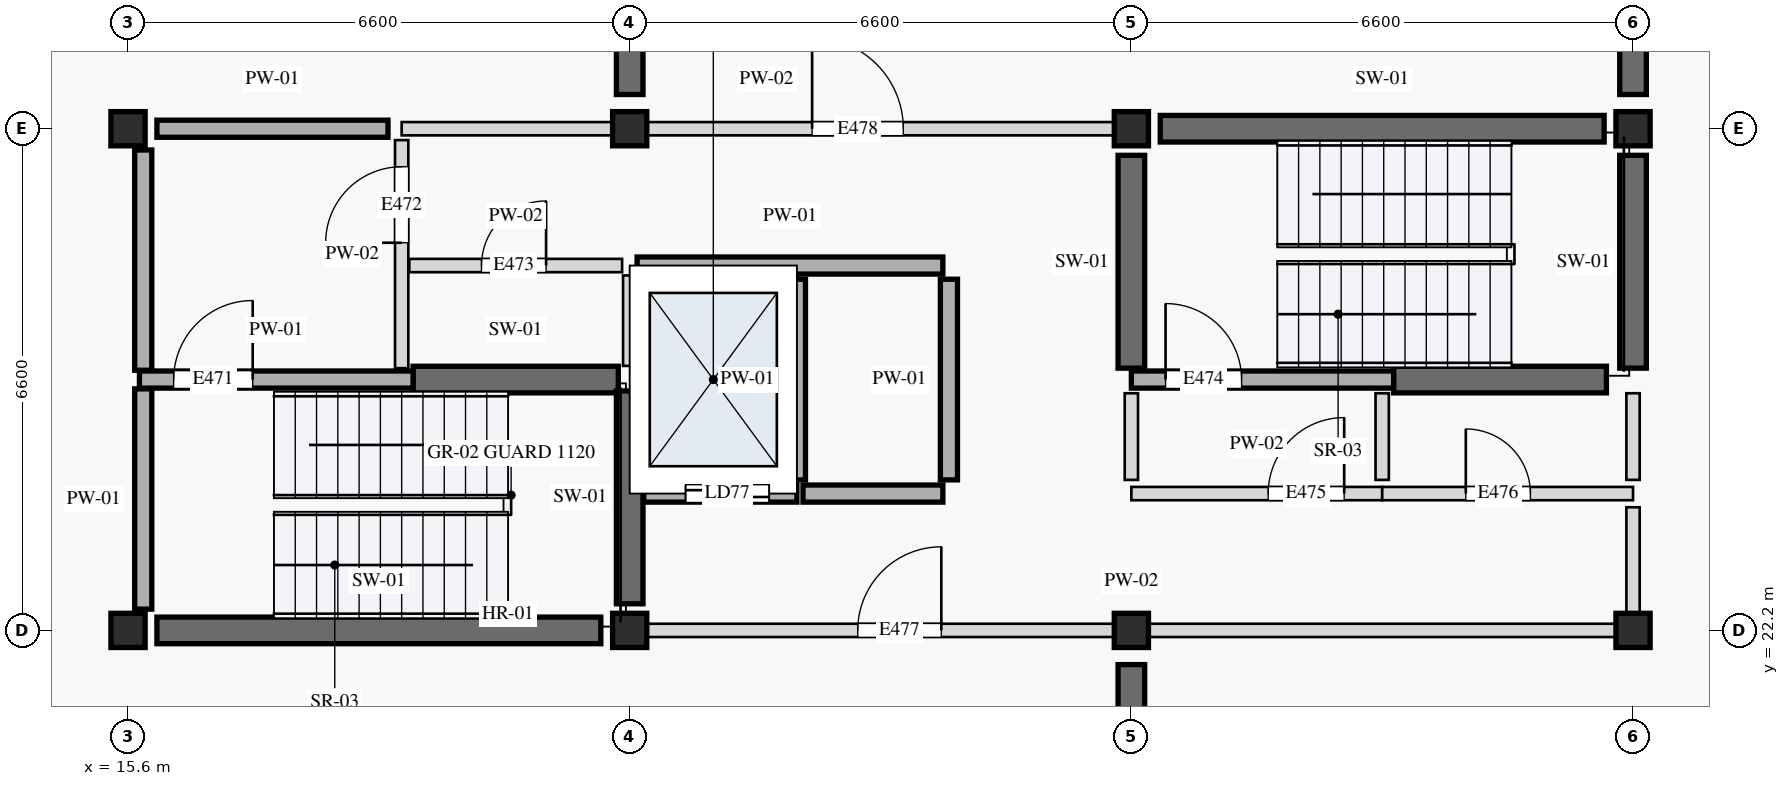
"""IFC4 building model, lengths in metres.
Left out: names, types, materials, properties, quantities, classifications, styles, units other than length and angle.
Written with IfcOpenShell. Run it as: python <this file> out.ifc"""

import sys

from ifc_helpers import new_model, si_unit, direction, frame, frame_2d, origin, origin_2d, place, context, subcontext, project, spatial, rectangle, extrude, element, fill, save


model = new_model("IFC4")
c1 = context("Model", 3, precision=1e-05, world=origin(), true_north=direction((0.0, 1.0)))
c2 = subcontext(c1, "Body", "Model", "MODEL_VIEW")
j1 = project(units=[si_unit("LENGTHUNIT", "METRE"), si_unit("PLANEANGLEUNIT", "RADIAN")], contexts=[c1])
p1 = place(None, origin())
s1 = spatial("IfcSite", under=j1, at=p1, CompositionType="ELEMENT")
p2 = place(p1, origin())
s2 = spatial("IfcBuilding", under=s1, at=p2, CompositionType="ELEMENT")
p3 = place(p2, frame((0.0, 0.0, -3.8)))
s3 = spatial("IfcBuildingStorey", under=s2, at=p3, CompositionType="ELEMENT", Elevation=-3.8)
for number, where, z_axis, x_axis in (
    (1, (15.6, 22.2, 0.0), (0.0, 0.0, 1.0), (1.0, 0.0, 0.0)),
    (2, (15.6, 28.8, 0.0), (0.0, 0.0, 1.0), (1.0, 0.0, 0.0)),
    (3, (22.2, 22.2, 0.0), (0.0, 0.0, 1.0), (1.0, 0.0, 0.0)),
    (4, (22.2, 28.8, 0.0), (0.0, 0.0, 1.0), (1.0, 0.0, 0.0)),
    (5, (28.8, 22.2, 0.0), (0.0, 0.0, 1.0), (1.0, 0.0, 0.0)),
    (6, (28.8, 28.8, 0.0), (0.0, 0.0, 1.0), (1.0, 0.0, 0.0)),
    (7, (35.4, 22.2, 0.0), (0.0, 0.0, 1.0), (1.0, 0.0, 0.0)),
    (8, (35.4, 28.8, 0.0), (0.0, 0.0, 1.0), (1.0, 0.0, 0.0)),
):
    element("IfcColumn", number, at=place(p3, frame(where, z_axis=z_axis, x_axis=x_axis)), inside=s3, PredefinedType="COLUMN", context=c2, shape_type="SweptSolid", body=[
        extrude(rectangle(XDim=0.45, YDim=0.45, at=origin_2d()), origin(), (0.0, 0.0, 1.0), 3.8),
    ])
p4 = place(p3, frame((15.98, 22.2, 0.0), z_axis=(0.0, 0.0, 1.0), x_axis=(1.0, 0.0, 0.0)))
e9 = element("IfcWall", 9, at=p4, inside=s3, PredefinedType="SHEAR", context=c2, shape_type="SweptSolid", body=[
    extrude(rectangle(XDim=5.84, YDim=0.35, at=frame_2d((2.92, 0.0))), origin(), (0.0, 0.0, 1.0), 3.52),
])
p5 = place(p3, frame((19.35, 25.5, 0.0), z_axis=(0.0, 0.0, 1.0), x_axis=(1.0, 0.0, 0.0)))
e10 = element("IfcWall", 10, at=p5, inside=s3, PredefinedType="SHEAR", context=c2, shape_type="SweptSolid", body=[
    extrude(rectangle(XDim=2.7, YDim=0.35, at=frame_2d((1.35, 0.0))), origin(), (0.0, 0.0, 1.0), 3.52),
])
p6 = place(p3, frame((22.2, 22.55, 0.0), z_axis=(0.0, 0.0, 1.0), x_axis=(0.0, 1.0, 0.0)))
e11 = element("IfcWall", 11, at=p6, inside=s3, PredefinedType="SHEAR", context=c2, shape_type="SweptSolid", body=[
    extrude(rectangle(XDim=2.8, YDim=0.35, at=frame_2d((1.4, 0.0))), origin(), (0.0, 0.0, 1.0), 3.52),
])
p7 = place(p3, frame((29.18, 28.8, 0.0), z_axis=(0.0, 0.0, 1.0), x_axis=(1.0, 0.0, 0.0)))
e12 = element("IfcWall", 12, at=p7, inside=s3, PredefinedType="SHEAR", context=c2, shape_type="SweptSolid", body=[
    extrude(rectangle(XDim=5.84, YDim=0.35, at=frame_2d((2.92, 0.0))), origin(), (0.0, 0.0, 1.0), 3.52),
])
for number, where, z_axis, x_axis in (
    (13, (32.25, 25.5, 0.0), (0.0, 0.0, 1.0), (1.0, 0.0, 0.0)),
    (14, (28.8, 25.65, 0.0), (0.0, 0.0, 1.0), (0.0, 1.0, 0.0)),
    (15, (35.4, 25.65, 0.0), (0.0, 0.0, 1.0), (0.0, 1.0, 0.0)),
):
    element("IfcWall", number, at=place(p3, frame(where, z_axis=z_axis, x_axis=x_axis)), inside=s3, PredefinedType="SHEAR", context=c2, shape_type="SweptSolid", body=[
        extrude(rectangle(XDim=2.8, YDim=0.35, at=frame_2d((1.4, 0.0))), origin(), (0.0, 0.0, 1.0), 3.52),
    ])
for number, where, z_axis, x_axis in (
    (16, (28.8, 16.05, 0.0), (0.0, 0.0, 1.0), (0.0, 1.0, 0.0)),
    (17, (22.2, 29.25, 0.0), (0.0, 0.0, 1.0), (0.0, 1.0, 0.0)),
    (18, (35.4, 29.25, 0.0), (0.0, 0.0, 1.0), (0.0, 1.0, 0.0)),
):
    element("IfcWall", number, at=place(p3, frame(where, z_axis=z_axis, x_axis=x_axis)), inside=s3, PredefinedType="SHEAR", context=c2, shape_type="SweptSolid", body=[
        extrude(rectangle(XDim=5.7, YDim=0.35, at=frame_2d((2.85, 0.0))), origin(), (0.0, 0.0, 1.0), 3.52),
    ])
p8 = place(p3, frame((15.75, 25.5, 0.0), z_axis=(0.0, 0.0, 1.0), x_axis=(1.0, 0.0, 0.0)))
e19 = element("IfcWall", 19, at=p8, inside=s3, PredefinedType="STANDARD", context=c2, shape_type="SweptSolid", body=[
    extrude(rectangle(XDim=3.6, YDim=0.225, at=frame_2d((1.8, 0.0))), origin(), (0.0, 0.0, 1.0), 3.52),
])
p9 = place(p8, frame((0.45, 0.0, 0.0)))
e20 = element("IfcOpeningElement", 20, at=p9, cuts=e19, PredefinedType="OPENING", context=c2, shape_type="SweptSolid", body=[
    extrude(rectangle(XDim=1.04, YDim=2.12, at=frame_2d((0.52, 1.06))), frame((0.0, 0.123, 0.0), z_axis=(0.0, -1.0, 0.0), x_axis=(1.0, 0.0, 0.0)), (0.0, 0.0, 1.0), 0.245),
])
p10 = place(p3, frame((19.2, 25.65, 0.0), z_axis=(0.0, 0.0, 1.0), x_axis=(0.0, 1.0, 0.0)))
e21 = element("IfcWall", 21, at=p10, inside=s3, PredefinedType="PARTITIONING", context=c2, shape_type="SweptSolid", body=[
    extrude(rectangle(XDim=3.0, YDim=0.175, at=frame_2d((1.5, 0.0))), origin(), (0.0, 0.0, 1.0), 3.52),
])
p11 = place(p10, frame((1.65, 0.0, 0.0)))
e22 = element("IfcOpeningElement", 22, at=p11, cuts=e21, PredefinedType="OPENING", context=c2, shape_type="SweptSolid", body=[
    extrude(rectangle(XDim=1.0, YDim=2.1, at=frame_2d((0.5, 1.05))), frame((0.0, 0.097, 0.0), z_axis=(0.0, -1.0, 0.0), x_axis=(1.0, 0.0, 0.0)), (0.0, 0.0, 1.0), 0.195),
])
p12 = place(p3, frame((19.3, 27.0, 0.0), z_axis=(0.0, 0.0, 1.0), x_axis=(1.0, 0.0, 0.0)))
e23 = element("IfcWall", 23, at=p12, inside=s3, PredefinedType="PARTITIONING", context=c2, shape_type="SweptSolid", body=[
    extrude(rectangle(XDim=2.8, YDim=0.175, at=frame_2d((1.4, 0.0))), origin(), (0.0, 0.0, 1.0), 3.52),
])
p13 = place(p12, frame((0.95, 0.0, 0.0)))
e24 = element("IfcOpeningElement", 24, at=p13, cuts=e23, PredefinedType="OPENING", context=c2, shape_type="SweptSolid", body=[
    extrude(rectangle(XDim=0.85, YDim=2.0, at=frame_2d((0.425, 1.0))), frame((0.0, 0.097, 0.0), z_axis=(0.0, -1.0, 0.0), x_axis=(1.0, 0.0, 0.0)), (0.0, 0.0, 1.0), 0.195),
])
p14 = place(p3, frame((22.2, 25.68, 0.0), z_axis=(0.0, 0.0, 1.0), x_axis=(0.0, 1.0, 0.0)))
e25 = element("IfcWall", 25, at=p14, inside=s3, PredefinedType="PARTITIONING", context=c2, shape_type="SweptSolid", body=[
    extrude(rectangle(XDim=1.19, YDim=0.175, at=frame_2d((0.595, 0.0))), origin(), (0.0, 0.0, 1.0), 3.52),
])
p15 = place(p3, frame((22.385, 24.0, 0.0), z_axis=(0.0, 0.0, 1.0), x_axis=(1.0, 0.0, 0.0)))
e26 = element("IfcWall", 26, at=p15, inside=s3, PredefinedType="STANDARD", context=c2, shape_type="SweptSolid", body=[
    extrude(rectangle(XDim=2.015, YDim=0.225, at=frame_2d((1.007, 0.0))), origin(), (0.0, 0.0, 1.0), 3.52),
])
p16 = place(p15, frame((0.55, 0.0, 0.0)))
e27 = element("IfcOpeningElement", 27, at=p16, cuts=e26, PredefinedType="OPENING", context=c2, shape_type="SweptSolid", body=[
    extrude(rectangle(XDim=1.1, YDim=2.1, at=frame_2d((0.55, 1.05))), frame((0.0, 0.123, 0.0), z_axis=(0.0, -1.0, 0.0), x_axis=(1.0, 0.0, 0.0)), (0.0, 0.0, 1.0), 0.245),
])
p17 = place(p3, frame((24.48, 24.0, 0.0), z_axis=(0.0, 0.0, 1.0), x_axis=(1.0, 0.0, 0.0)))
e28 = element("IfcWall", 28, at=p17, inside=s3, PredefinedType="STANDARD", context=c2, shape_type="SweptSolid", body=[
    extrude(rectangle(XDim=1.84, YDim=0.225, at=frame_2d((0.92, 0.0))), origin(), (0.0, 0.0, 1.0), 3.52),
])
p18 = place(p3, frame((22.298, 27.0, 0.0), z_axis=(0.0, 0.0, 1.0), x_axis=(1.0, 0.0, 0.0)))
e29 = element("IfcWall", 29, at=p18, inside=s3, PredefinedType="STANDARD", context=c2, shape_type="SweptSolid", body=[
    extrude(rectangle(XDim=4.022, YDim=0.225, at=frame_2d((2.011, 0.0))), origin(), (0.0, 0.0, 1.0), 3.52),
])
for number, where, z_axis, x_axis in (
    (30, (24.4, 24.18, 0.0), (0.0, 0.0, 1.0), (0.0, 1.0, 0.0)),
    (31, (26.4, 24.18, 0.0), (0.0, 0.0, 1.0), (0.0, 1.0, 0.0)),
):
    element("IfcWall", number, at=place(p3, frame(where, z_axis=z_axis, x_axis=x_axis)), inside=s3, PredefinedType="STANDARD", context=c2, shape_type="SweptSolid", body=[
        extrude(rectangle(XDim=2.64, YDim=0.225, at=frame_2d((1.32, 0.0))), origin(), (0.0, 0.0, 1.0), 3.52),
    ])
p19 = place(p3, frame((28.8, 25.5, 0.0), z_axis=(0.0, 0.0, 1.0), x_axis=(1.0, 0.0, 0.0)))
e32 = element("IfcWall", 32, at=p19, inside=s3, PredefinedType="STANDARD", context=c2, shape_type="SweptSolid", body=[
    extrude(rectangle(XDim=3.45, YDim=0.225, at=frame_2d((1.725, 0.0))), origin(), (0.0, 0.0, 1.0), 3.52),
])
p20 = place(p19, frame((0.45, 0.0, 0.0)))
e33 = element("IfcOpeningElement", 33, at=p20, cuts=e32, PredefinedType="OPENING", context=c2, shape_type="SweptSolid", body=[
    extrude(rectangle(XDim=1.0, YDim=2.1, at=frame_2d((0.5, 1.05))), frame((0.0, 0.123, 0.0), z_axis=(0.0, -1.0, 0.0), x_axis=(1.0, 0.0, 0.0)), (0.0, 0.0, 1.0), 0.245),
])
p21 = place(p3, frame((28.8, 24.0, 0.0), z_axis=(0.0, 0.0, 1.0), x_axis=(1.0, 0.0, 0.0)))
e34 = element("IfcWall", 34, at=p21, inside=s3, PredefinedType="PARTITIONING", context=c2, shape_type="SweptSolid", body=[
    extrude(rectangle(XDim=3.3, YDim=0.175, at=frame_2d((1.65, 0.0))), origin(), (0.0, 0.0, 1.0), 3.52),
])
p22 = place(p21, frame((1.8, 0.0, 0.0)))
e35 = element("IfcOpeningElement", 35, at=p22, cuts=e34, PredefinedType="OPENING", context=c2, shape_type="SweptSolid", body=[
    extrude(rectangle(XDim=1.0, YDim=2.16, at=frame_2d((0.5, 1.08))), frame((0.0, 0.097, 0.0), z_axis=(0.0, -1.0, 0.0), x_axis=(1.0, 0.0, 0.0)), (0.0, 0.0, 1.0), 0.195),
])
p23 = place(p3, frame((32.1, 24.0, 0.0), z_axis=(0.0, 0.0, 1.0), x_axis=(1.0, 0.0, 0.0)))
e36 = element("IfcWall", 36, at=p23, inside=s3, PredefinedType="PARTITIONING", context=c2, shape_type="SweptSolid", body=[
    extrude(rectangle(XDim=3.3, YDim=0.175, at=frame_2d((1.65, 0.0))), origin(), (0.0, 0.0, 1.0), 3.52),
])
p24 = place(p23, frame((1.1, 0.0, 0.0)))
e37 = element("IfcOpeningElement", 37, at=p24, cuts=e36, PredefinedType="OPENING", context=c2, shape_type="SweptSolid", body=[
    extrude(rectangle(XDim=0.85, YDim=2.0, at=frame_2d((0.425, 1.0))), frame((0.0, 0.097, 0.0), z_axis=(0.0, -1.0, 0.0), x_axis=(1.0, 0.0, 0.0)), (0.0, 0.0, 1.0), 0.195),
])
p25 = place(p3, frame((28.8, 24.18, 0.0), z_axis=(0.0, 0.0, 1.0), x_axis=(0.0, 1.0, 0.0)))
e38 = element("IfcWall", 38, at=p25, inside=s3, PredefinedType="PARTITIONING", context=c2, shape_type="SweptSolid", body=[
    extrude(rectangle(XDim=1.14, YDim=0.175, at=frame_2d((0.57, 0.0))), origin(), (0.0, 0.0, 1.0), 3.35),
])
for number, where, z_axis, x_axis in (
    (39, (32.1, 24.18, 0.0), (0.0, 0.0, 1.0), (0.0, 1.0, 0.0)),
    (40, (35.4, 24.18, 0.0), (0.0, 0.0, 1.0), (0.0, 1.0, 0.0)),
):
    element("IfcWall", number, at=place(p3, frame(where, z_axis=z_axis, x_axis=x_axis)), inside=s3, PredefinedType="PARTITIONING", context=c2, shape_type="SweptSolid", body=[
        extrude(rectangle(XDim=1.14, YDim=0.175, at=frame_2d((0.57, 0.0))), origin(), (0.0, 0.0, 1.0), 3.52),
    ])
p26 = place(p3, frame((22.2, 22.2, 0.0), z_axis=(0.0, 0.0, 1.0), x_axis=(1.0, 0.0, 0.0)))
e41 = element("IfcWall", 41, at=p26, inside=s3, PredefinedType="PARTITIONING", context=c2, shape_type="SweptSolid", body=[
    extrude(rectangle(XDim=13.2, YDim=0.175, at=frame_2d((6.6, 0.0))), origin(), (0.0, 0.0, 1.0), 3.15),
])
p27 = place(p26, frame((3.0, 0.0, 0.0)))
e42 = element("IfcOpeningElement", 42, at=p27, cuts=e41, PredefinedType="OPENING", context=c2, shape_type="SweptSolid", body=[
    extrude(rectangle(XDim=1.1, YDim=2.15, at=frame_2d((0.55, 1.075))), frame((0.0, 0.097, 0.0), z_axis=(0.0, -1.0, 0.0), x_axis=(1.0, 0.0, 0.0)), (0.0, 0.0, 1.0), 0.195),
])
p28 = place(p3, frame((19.2, 28.8, 0.0), z_axis=(0.0, 0.0, 1.0), x_axis=(1.0, 0.0, 0.0)))
e43 = element("IfcWall", 43, at=p28, inside=s3, PredefinedType="PARTITIONING", context=c2, shape_type="SweptSolid", body=[
    extrude(rectangle(XDim=9.6, YDim=0.175, at=frame_2d((4.8, 0.0))), origin(), (0.0, 0.0, 1.0), 3.15),
])
p29 = place(p28, frame((5.4, 0.0, 0.0)))
e44 = element("IfcOpeningElement", 44, at=p29, cuts=e43, PredefinedType="OPENING", context=c2, shape_type="SweptSolid", body=[
    extrude(rectangle(XDim=1.2, YDim=2.18, at=frame_2d((0.6, 1.09))), frame((0.0, 0.097, 0.0), z_axis=(0.0, -1.0, 0.0), x_axis=(1.0, 0.0, 0.0)), (0.0, 0.0, 1.0), 0.195),
])
p30 = place(p3, frame((35.4, 22.38, 0.0), z_axis=(0.0, 0.0, 1.0), x_axis=(0.0, 1.0, 0.0)))
e45 = element("IfcWall", 45, at=p30, inside=s3, PredefinedType="PARTITIONING", context=c2, shape_type="SweptSolid", body=[
    extrude(rectangle(XDim=1.44, YDim=0.175, at=frame_2d((0.72, 0.0))), origin(), (0.0, 0.0, 1.0), 3.52),
])
p31 = place(p3, frame((15.98, 28.8, 0.0), z_axis=(0.0, 0.0, 1.0), x_axis=(1.0, 0.0, 0.0)))
e46 = element("IfcWall", 46, at=p31, inside=s3, PredefinedType="STANDARD", context=c2, shape_type="SweptSolid", body=[
    extrude(rectangle(XDim=3.04, YDim=0.225, at=frame_2d((1.52, 0.0))), origin(), (0.0, 0.0, 1.0), 3.15),
])
for number, where, z_axis, x_axis in (
    (47, (15.8, 22.48, 0.0), (0.0, 0.0, 1.0), (0.0, 1.0, 0.0)),
    (48, (15.8, 25.623, 0.0), (0.0, 0.0, 1.0), (0.0, 1.0, 0.0)),
):
    element("IfcWall", number, at=place(p3, frame(where, z_axis=z_axis, x_axis=x_axis)), inside=s3, PredefinedType="STANDARD", context=c2, shape_type="SweptSolid", body=[
        extrude(rectangle(XDim=2.897, YDim=0.225, at=frame_2d((1.449, 0.0))), origin(), (0.0, 0.0, 1.0), 3.52),
    ])
p32 = place(p9, origin())
e49 = element("IfcDoor", 49, at=p32, inside=s3, OperationType="SINGLE_SWING_RIGHT", PredefinedType="DOOR", context=c2, shape_type="SweptSolid", body=[
    extrude(rectangle(XDim=1.04, YDim=2.12, at=frame_2d((0.52, 1.06))), frame((0.0, 0.025, 0.0), z_axis=(0.0, -1.0, 0.0), x_axis=(1.0, 0.0, 0.0)), (0.0, 0.0, 1.0), 0.05),
])
fill(e20, e49)
p33 = place(p11, origin())
e50 = element("IfcDoor", 50, at=p33, inside=s3, OperationType="SINGLE_SWING_LEFT", PredefinedType="DOOR", context=c2, shape_type="SweptSolid", body=[
    extrude(rectangle(XDim=1.0, YDim=2.1, at=frame_2d((0.5, 1.05))), frame((0.0, 0.025, 0.0), z_axis=(0.0, -1.0, 0.0), x_axis=(1.0, 0.0, 0.0)), (0.0, 0.0, 1.0), 0.05),
])
fill(e22, e50)
p34 = place(p13, origin())
e51 = element("IfcDoor", 51, at=p34, inside=s3, OperationType="SINGLE_SWING_RIGHT", PredefinedType="DOOR", context=c2, shape_type="SweptSolid", body=[
    extrude(rectangle(XDim=0.85, YDim=2.0, at=frame_2d((0.425, 1.0))), frame((0.0, 0.025, 0.0), z_axis=(0.0, -1.0, 0.0), x_axis=(1.0, 0.0, 0.0)), (0.0, 0.0, 1.0), 0.05),
])
fill(e24, e51)
p35 = place(p16, origin())
e52 = element("IfcDoor", 52, at=p35, inside=s3, OperationType="DOUBLE_DOOR_SLIDING", PredefinedType="DOOR", context=c2, shape_type="SweptSolid", body=[
    extrude(rectangle(XDim=1.1, YDim=2.1, at=frame_2d((0.55, 1.05))), frame((0.0, 0.025, 0.0), z_axis=(0.0, -1.0, 0.0), x_axis=(1.0, 0.0, 0.0)), (0.0, 0.0, 1.0), 0.05),
])
fill(e27, e52)
p36 = place(p20, origin())
e53 = element("IfcDoor", 53, at=p36, inside=s3, OperationType="SINGLE_SWING_LEFT", PredefinedType="DOOR", context=c2, shape_type="SweptSolid", body=[
    extrude(rectangle(XDim=1.0, YDim=2.1, at=frame_2d((0.5, 1.05))), frame((0.0, 0.025, 0.0), z_axis=(0.0, -1.0, 0.0), x_axis=(1.0, 0.0, 0.0)), (0.0, 0.0, 1.0), 0.05),
])
fill(e33, e53)
p37 = place(p22, origin())
e54 = element("IfcDoor", 54, at=p37, inside=s3, OperationType="SINGLE_SWING_RIGHT", PredefinedType="DOOR", context=c2, shape_type="SweptSolid", body=[
    extrude(rectangle(XDim=1.0, YDim=2.16, at=frame_2d((0.5, 1.08))), frame((0.0, 0.025, 0.0), z_axis=(0.0, -1.0, 0.0), x_axis=(1.0, 0.0, 0.0)), (0.0, 0.0, 1.0), 0.05),
])
fill(e35, e54)
p38 = place(p24, origin())
e55 = element("IfcDoor", 55, at=p38, inside=s3, OperationType="SINGLE_SWING_LEFT", PredefinedType="DOOR", context=c2, shape_type="SweptSolid", body=[
    extrude(rectangle(XDim=0.85, YDim=2.0, at=frame_2d((0.425, 1.0))), frame((0.0, 0.025, 0.0), z_axis=(0.0, -1.0, 0.0), x_axis=(1.0, 0.0, 0.0)), (0.0, 0.0, 1.0), 0.05),
])
fill(e37, e55)
p39 = place(p27, origin())
e56 = element("IfcDoor", 56, at=p39, inside=s3, OperationType="SINGLE_SWING_RIGHT", PredefinedType="DOOR", context=c2, shape_type="SweptSolid", body=[
    extrude(rectangle(XDim=1.1, YDim=2.15, at=frame_2d((0.55, 1.075))), frame((0.0, 0.025, 0.0), z_axis=(0.0, -1.0, 0.0), x_axis=(1.0, 0.0, 0.0)), (0.0, 0.0, 1.0), 0.05),
])
fill(e42, e56)
p40 = place(p29, origin())
e57 = element("IfcDoor", 57, at=p40, inside=s3, OperationType="SINGLE_SWING_LEFT", PredefinedType="DOOR", context=c2, shape_type="SweptSolid", body=[
    extrude(rectangle(XDim=1.2, YDim=2.18, at=frame_2d((0.6, 1.09))), frame((0.0, 0.025, 0.0), z_axis=(0.0, -1.0, 0.0), x_axis=(1.0, 0.0, 0.0)), (0.0, 0.0, 1.0), 0.05),
])
fill(e44, e57)
save(model, sys.argv[1])
